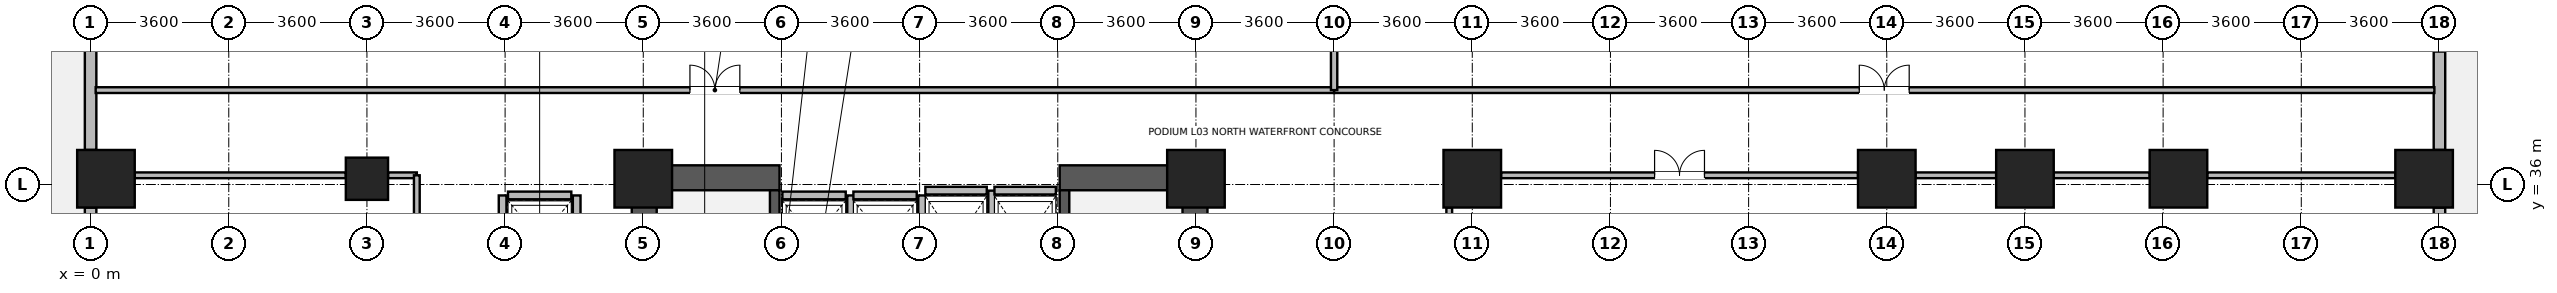
"""IFC4 building model, lengths in metres.
Left out: names, types, materials, properties, quantities, classifications, styles, units other than length and angle.
Written with IfcOpenShell. Run it as: python <this file> out.ifc"""

import sys

from ifc_helpers import new_model, si_unit, direction, frame, frame_2d, origin, origin_2d, place, context, subcontext, project, spatial, rectangle, circle, extrude, source, transform, mapped, element, fill, save


model = new_model("IFC4")
c1 = context("Model", 3, precision=1e-05, world=origin(), true_north=direction((0.0, 1.0)))
c2 = subcontext(c1, "Body", "Model", "MODEL_VIEW")
j1 = project(units=[si_unit("LENGTHUNIT", "METRE"), si_unit("PLANEANGLEUNIT", "RADIAN")], contexts=[c1])
p1 = place(None, origin())
s1 = spatial("IfcSite", under=j1, at=p1, CompositionType="ELEMENT")
p2 = place(p1, origin())
s2 = spatial("IfcBuilding", under=s1, at=p2, CompositionType="ELEMENT")
p3 = place(p2, frame((0.0, 0.0, 15.0)))
s3 = spatial("IfcBuildingStorey", under=s2, at=p3, CompositionType="ELEMENT", Elevation=15.0)
for number, where, z_axis, x_axis in (
    (1, (14.425, 28.2, 0.0), (0.0, 0.0, 1.0), (0.0, 1.0, 0.0)),
    (2, (28.775, 28.2, 0.0), (0.0, 0.0, 1.0), (0.0, 1.0, 0.0)),
):
    element("IfcWall", number, at=place(p3, frame(where, z_axis=z_axis, x_axis=x_axis)), inside=s3, PredefinedType="SHEAR", context=c2, shape_type="SweptSolid", body=[
        extrude(rectangle(XDim=8.3, YDim=0.65, at=frame_2d((4.15, 0.0))), origin(), (0.0, 0.0, 1.0), 4.38),
    ])
for number, where, z_axis, x_axis in (
    (3, (14.75, 36.175, 0.0), (0.0, 0.0, 1.0), (1.0, 0.0, 0.0)),
    (4, (25.25, 36.175, 0.0), (0.0, 0.0, 1.0), (1.0, 0.0, 0.0)),
):
    element("IfcWall", number, at=place(p3, frame(where, z_axis=z_axis, x_axis=x_axis)), inside=s3, PredefinedType="SHEAR", context=c2, shape_type="SweptSolid", body=[
        extrude(rectangle(XDim=3.2, YDim=0.65, at=frame_2d((1.6, 0.0))), origin(), (0.0, 0.0, 1.0), 4.38),
    ])
p4 = place(p3, frame((17.825, 28.85, 0.0), z_axis=(0.0, 0.0, 1.0), x_axis=(0.0, 1.0, 0.0)))
e5 = element("IfcWall", 5, at=p4, inside=s3, PredefinedType="SHEAR", context=c2, shape_type="SweptSolid", body=[
    extrude(rectangle(XDim=7.0, YDim=0.25, at=frame_2d((3.5, 0.0))), origin(), (0.0, 0.0, 1.0), 4.38),
])
p5 = place(p4, frame((0.15, 0.0, 0.0)))
e6 = element("IfcOpeningElement", 6, at=p5, cuts=e5, PredefinedType="OPENING", context=c2, shape_type="SweptSolid", body=[
    extrude(rectangle(XDim=1.1, YDim=2.08, at=frame_2d((0.55, 1.04))), frame((0.0, 0.135, 0.0), z_axis=(0.0, -1.0, 0.0), x_axis=(1.0, 0.0, 0.0)), (0.0, 0.0, 1.0), 0.27),
])
p6 = place(p3, frame((25.375, 28.85, 0.0), z_axis=(0.0, 0.0, 1.0), x_axis=(0.0, 1.0, 0.0)))
e7 = element("IfcWall", 7, at=p6, inside=s3, PredefinedType="SHEAR", context=c2, shape_type="SweptSolid", body=[
    extrude(rectangle(XDim=7.0, YDim=0.25, at=frame_2d((3.5, 0.0))), origin(), (0.0, 0.0, 1.0), 4.38),
])
p7 = place(p6, frame((0.15, 0.0, 0.0)))
e8 = element("IfcOpeningElement", 8, at=p7, cuts=e7, PredefinedType="OPENING", context=c2, shape_type="SweptSolid", body=[
    extrude(rectangle(XDim=1.1, YDim=2.08, at=frame_2d((0.55, 1.04))), frame((0.0, 0.135, 0.0), z_axis=(0.0, -1.0, 0.0), x_axis=(1.0, 0.0, 0.0)), (0.0, 0.0, 1.0), 0.27),
])
m1 = source(origin(), c2, "Body", "SweptSolid", [
    extrude(circle(Radius=0.55, at=origin_2d()), origin(), (0.0, 0.0, 1.0), 4.8),
])
p8 = place(p3, frame((7.2, 36.15, 0.0), z_axis=(0.0, 0.0, 1.0), x_axis=(1.0, 0.0, 0.0)))
e9 = element("IfcColumn", 9, at=p8, inside=s3, PredefinedType="COLUMN", context=c2, shape_type="MappedRepresentation", body=[
    mapped(m1, transform((0.0, 0.0, 0.0), x_axis=(1.0, 0.0, 0.0), y_axis=(0.0, 1.0, 0.0), z_axis=(0.0, 0.0, 1.0), scale=1.0)),
])
m2 = source(origin(), c2, "Body", "SweptSolid", [
    extrude(rectangle(XDim=1.5, YDim=1.5, at=origin_2d()), origin(), (0.0, 0.0, 1.0), 4.8),
])
for number, where, z_axis, x_axis in (
    (10, (14.4, 36.15, 0.0), (0.0, 0.0, 1.0), (1.0, 0.0, 0.0)),
    (11, (28.8, 36.15, 0.0), (0.0, 0.0, 1.0), (1.0, 0.0, 0.0)),
    (12, (36.0, 36.15, 0.0), (0.0, 0.0, 1.0), (1.0, 0.0, 0.0)),
    (13, (46.8, 36.15, 0.0), (0.0, 0.0, 1.0), (1.0, 0.0, 0.0)),
    (14, (50.4, 36.15, 0.0), (0.0, 0.0, 1.0), (1.0, 0.0, 0.0)),
    (15, (54.4, 36.15, 0.0), (0.0, 0.0, 1.0), (1.0, 0.0, 0.0)),
    (16, (0.4, 36.15, 0.0), (0.0, 0.0, 1.0), (1.0, 0.0, 0.0)),
    (17, (60.8, 36.15, 0.0), (0.0, 0.0, 1.0), (1.0, 0.0, 0.0)),
):
    element("IfcColumn", number, at=place(p3, frame(where, z_axis=z_axis, x_axis=x_axis)), inside=s3, PredefinedType="COLUMN", context=c2, shape_type="MappedRepresentation", body=[
        mapped(m2, transform((0.0, 0.0, 0.0), x_axis=(1.0, 0.0, 0.0), y_axis=(0.0, 1.0, 0.0), z_axis=(0.0, 0.0, 1.0), scale=1.0)),
    ])
p9 = place(p3, frame((61.2, 35.399, 0.0), z_axis=(0.0, 0.0, 1.0), x_axis=(0.0, -1.0, 0.0)))
e18 = element("IfcWall", 18, at=p9, inside=s3, PredefinedType="STANDARD", context=c2, shape_type="SweptSolid", body=[
    extrude(rectangle(XDim=5.998, YDim=0.3, at=frame_2d((2.999, 0.0))), origin(), (0.0, 0.0, 1.0), 4.36),
])
p10 = place(p9, frame((2.524, 0.0, 0.9)))
e19 = element("IfcOpeningElement", 19, at=p10, cuts=e18, PredefinedType="OPENING", context=c2, shape_type="SweptSolid", body=[
    extrude(rectangle(XDim=0.95, YDim=1.75, at=frame_2d((0.475, 0.875))), frame((0.0, 0.16, 0.0), z_axis=(0.0, -1.0, 0.0), x_axis=(1.0, 0.0, 0.0)), (0.0, 0.0, 1.0), 0.32),
])
p11 = place(p9, frame((1.037, 0.0, 0.9)))
e20 = element("IfcOpeningElement", 20, at=p11, cuts=e18, PredefinedType="OPENING", context=c2, shape_type="SweptSolid", body=[
    extrude(rectangle(XDim=0.95, YDim=1.75, at=frame_2d((0.475, 0.875))), frame((0.0, 0.16, 0.0), z_axis=(0.0, -1.0, 0.0), x_axis=(1.0, 0.0, 0.0)), (0.0, 0.0, 1.0), 0.32),
])
p12 = place(p3, frame((61.2, 44.099, 0.0), z_axis=(0.0, 0.0, 1.0), x_axis=(0.0, -1.0, 0.0)))
e21 = element("IfcWall", 21, at=p12, inside=s3, PredefinedType="STANDARD", context=c2, shape_type="SweptSolid", body=[
    extrude(rectangle(XDim=7.198, YDim=0.3, at=frame_2d((3.599, 0.0))), origin(), (0.0, 0.0, 1.0), 4.36),
])
p13 = place(p12, frame((0.6, 0.0, 0.9)))
e22 = element("IfcOpeningElement", 22, at=p13, cuts=e21, PredefinedType="OPENING", context=c2, shape_type="SweptSolid", body=[
    extrude(rectangle(XDim=2.4, YDim=2.5, at=frame_2d((1.2, 1.25))), frame((0.0, 0.16, 0.0), z_axis=(0.0, -1.0, 0.0), x_axis=(1.0, 0.0, 0.0)), (0.0, 0.0, 1.0), 0.32),
])
p14 = place(p12, frame((3.7, 0.0, 0.9)))
e23 = element("IfcOpeningElement", 23, at=p14, cuts=e21, PredefinedType="OPENING", context=c2, shape_type="SweptSolid", body=[
    extrude(rectangle(XDim=0.95, YDim=1.75, at=frame_2d((0.475, 0.875))), frame((0.0, 0.16, 0.0), z_axis=(0.0, -1.0, 0.0), x_axis=(1.0, 0.0, 0.0)), (0.0, 0.0, 1.0), 0.32),
])
p15 = place(p3, frame((0.0, 36.901, 0.0), z_axis=(0.0, 0.0, 1.0), x_axis=(0.0, 1.0, 0.0)))
e24 = element("IfcWall", 24, at=p15, inside=s3, PredefinedType="STANDARD", context=c2, shape_type="SweptSolid", body=[
    extrude(rectangle(XDim=7.198, YDim=0.3, at=frame_2d((3.599, 0.0))), origin(), (0.0, 0.0, 1.0), 4.36),
])
p16 = place(p15, frame((2.699, 0.0, 0.0)))
e25 = element("IfcOpeningElement", 25, at=p16, cuts=e24, PredefinedType="OPENING", context=c2, shape_type="SweptSolid", body=[
    extrude(rectangle(XDim=1.8, YDim=2.2, at=frame_2d((0.9, 1.1))), frame((0.0, 0.16, 0.0), z_axis=(0.0, -1.0, 0.0), x_axis=(1.0, 0.0, 0.0)), (0.0, 0.0, 1.0), 0.32),
])
p17 = place(p3, frame((0.0, 29.401, 0.0), z_axis=(0.0, 0.0, 1.0), x_axis=(0.0, 1.0, 0.0)))
e26 = element("IfcWall", 26, at=p17, inside=s3, PredefinedType="STANDARD", context=c2, shape_type="SweptSolid", body=[
    extrude(rectangle(XDim=5.998, YDim=0.3, at=frame_2d((2.999, 0.0))), origin(), (0.0, 0.0, 1.0), 4.36),
])
p18 = place(p17, frame((2.524, 0.0, 0.9)))
e27 = element("IfcOpeningElement", 27, at=p18, cuts=e26, PredefinedType="OPENING", context=c2, shape_type="SweptSolid", body=[
    extrude(rectangle(XDim=0.95, YDim=1.75, at=frame_2d((0.475, 0.875))), frame((0.0, 0.16, 0.0), z_axis=(0.0, -1.0, 0.0), x_axis=(1.0, 0.0, 0.0)), (0.0, 0.0, 1.0), 0.32),
])
p19 = place(p17, frame((1.037, 0.0, 0.9)))
e28 = element("IfcOpeningElement", 28, at=p19, cuts=e26, PredefinedType="OPENING", context=c2, shape_type="SweptSolid", body=[
    extrude(rectangle(XDim=0.95, YDim=1.75, at=frame_2d((0.475, 0.875))), frame((0.0, 0.16, 0.0), z_axis=(0.0, -1.0, 0.0), x_axis=(1.0, 0.0, 0.0)), (0.0, 0.0, 1.0), 0.32),
])
p20 = place(p3, frame((18.025, 35.715, 0.0), z_axis=(0.0, 0.0, 1.0), x_axis=(1.0, 0.0, 0.0)))
e29 = element("IfcWall", 29, at=p20, inside=s3, PredefinedType="PARTITIONING", context=c2, shape_type="SweptSolid", body=[
    extrude(rectangle(XDim=1.65, YDim=0.2, at=frame_2d((0.825, 0.0))), origin(), (0.0, 0.0, 1.0), 4.36),
])
p21 = place(p3, frame((19.815, 33.485, 0.0), z_axis=(0.0, 0.0, 1.0), x_axis=(0.0, 1.0, 0.0)))
e30 = element("IfcWall", 30, at=p21, inside=s3, PredefinedType="PARTITIONING", context=c2, shape_type="SweptSolid", body=[
    extrude(rectangle(XDim=2.23, YDim=0.2, at=frame_2d((1.115, 0.0))), origin(), (0.0, 0.0, 1.0), 4.36),
])
p22 = place(p3, frame((19.875, 35.715, 0.0), z_axis=(0.0, 0.0, 1.0), x_axis=(1.0, 0.0, 0.0)))
e31 = element("IfcWall", 31, at=p22, inside=s3, PredefinedType="PARTITIONING", context=c2, shape_type="SweptSolid", body=[
    extrude(rectangle(XDim=1.65, YDim=0.2, at=frame_2d((0.825, 0.0))), origin(), (0.0, 0.0, 1.0), 4.36),
])
p23 = place(p3, frame((21.665, 33.485, 0.0), z_axis=(0.0, 0.0, 1.0), x_axis=(0.0, 1.0, 0.0)))
e32 = element("IfcWall", 32, at=p23, inside=s3, PredefinedType="PARTITIONING", context=c2, shape_type="SweptSolid", body=[
    extrude(rectangle(XDim=2.23, YDim=0.2, at=frame_2d((1.115, 0.0))), origin(), (0.0, 0.0, 1.0), 4.36),
])
p24 = place(p3, frame((10.875, 35.715, 0.0), z_axis=(0.0, 0.0, 1.0), x_axis=(1.0, 0.0, 0.0)))
e33 = element("IfcWall", 33, at=p24, inside=s3, PredefinedType="PARTITIONING", context=c2, shape_type="SweptSolid", body=[
    extrude(rectangle(XDim=1.65, YDim=0.2, at=frame_2d((0.825, 0.0))), origin(), (0.0, 0.0, 1.0), 4.36),
])
for number, where, z_axis, x_axis in (
    (34, (10.735, 33.485, 0.0), (0.0, 0.0, 1.0), (0.0, 1.0, 0.0)),
    (35, (12.665, 33.485, 0.0), (0.0, 0.0, 1.0), (0.0, 1.0, 0.0)),
):
    element("IfcWall", number, at=place(p3, frame(where, z_axis=z_axis, x_axis=x_axis)), inside=s3, PredefinedType="PARTITIONING", context=c2, shape_type="SweptSolid", body=[
        extrude(rectangle(XDim=2.23, YDim=0.2, at=frame_2d((1.115, 0.0))), origin(), (0.0, 0.0, 1.0), 4.36),
    ])
p25 = place(p3, frame((21.75, 35.84, 0.0), z_axis=(0.0, 0.0, 1.0), x_axis=(1.0, 0.0, 0.0)))
e36 = element("IfcWall", 36, at=p25, inside=s3, PredefinedType="PARTITIONING", context=c2, shape_type="SweptSolid", body=[
    extrude(rectangle(XDim=1.6, YDim=0.2, at=frame_2d((0.8, 0.0))), origin(), (0.0, 0.0, 1.0), 3.16),
])
p26 = place(p3, frame((23.49, 33.16, 0.0), z_axis=(0.0, 0.0, 1.0), x_axis=(0.0, 1.0, 0.0)))
e37 = element("IfcWall", 37, at=p26, inside=s3, PredefinedType="PARTITIONING", context=c2, shape_type="SweptSolid", body=[
    extrude(rectangle(XDim=2.68, YDim=0.2, at=frame_2d((1.34, 0.0))), origin(), (0.0, 0.0, 1.0), 4.36),
])
p27 = place(p3, frame((23.55, 35.84, 0.0), z_axis=(0.0, 0.0, 1.0), x_axis=(1.0, 0.0, 0.0)))
e38 = element("IfcWall", 38, at=p27, inside=s3, PredefinedType="PARTITIONING", context=c2, shape_type="SweptSolid", body=[
    extrude(rectangle(XDim=1.6, YDim=0.2, at=frame_2d((0.8, 0.0))), origin(), (0.0, 0.0, 1.0), 3.16),
])
p28 = place(p3, frame((0.132, 38.46, 0.0), z_axis=(0.0, 0.0, 1.0), x_axis=(1.0, 0.0, 0.0)))
e39 = element("IfcWall", 39, at=p28, inside=s3, PredefinedType="PARTITIONING", context=c2, shape_type="SweptSolid", body=[
    extrude(rectangle(XDim=32.268, YDim=0.15, at=frame_2d((16.134, 0.0))), origin(), (0.0, 0.0, 1.0), 4.36),
])
p29 = place(p28, frame((15.484, 0.0, 0.0)))
e40 = element("IfcOpeningElement", 40, at=p29, cuts=e39, PredefinedType="OPENING", context=c2, shape_type="SweptSolid", body=[
    extrude(rectangle(XDim=1.3, YDim=2.12, at=frame_2d((0.65, 1.06))), frame((0.0, 0.085, 0.0), z_axis=(0.0, -1.0, 0.0), x_axis=(1.0, 0.0, 0.0)), (0.0, 0.0, 1.0), 0.17),
])
p30 = place(p3, frame((32.4, 38.46, 0.0), z_axis=(0.0, 0.0, 1.0), x_axis=(1.0, 0.0, 0.0)))
e41 = element("IfcWall", 41, at=p30, inside=s3, PredefinedType="PARTITIONING", context=c2, shape_type="SweptSolid", body=[
    extrude(rectangle(XDim=28.668, YDim=0.15, at=frame_2d((14.334, 0.0))), origin(), (0.0, 0.0, 1.0), 4.36),
])
p31 = place(p30, frame((13.684, 0.0, 0.0)))
e42 = element("IfcOpeningElement", 42, at=p31, cuts=e41, PredefinedType="OPENING", context=c2, shape_type="SweptSolid", body=[
    extrude(rectangle(XDim=1.3, YDim=2.12, at=frame_2d((0.65, 1.06))), frame((0.0, 0.085, 0.0), z_axis=(0.0, -1.0, 0.0), x_axis=(1.0, 0.0, 0.0)), (0.0, 0.0, 1.0), 0.17),
])
p32 = place(p3, frame((36.75, 36.24, 0.0), z_axis=(0.0, 0.0, 1.0), x_axis=(1.0, 0.0, 0.0)))
e43 = element("IfcWall", 43, at=p32, inside=s3, PredefinedType="PARTITIONING", context=c2, shape_type="SweptSolid", body=[
    extrude(rectangle(XDim=9.3, YDim=0.15, at=frame_2d((4.65, 0.0))), origin(), (0.0, 0.0, 1.0), 3.66),
])
p33 = place(p32, frame((4.0, 0.0, 0.0)))
e44 = element("IfcOpeningElement", 44, at=p33, cuts=e43, PredefinedType="OPENING", context=c2, shape_type="SweptSolid", body=[
    extrude(rectangle(XDim=1.3, YDim=2.12, at=frame_2d((0.65, 1.06))), frame((0.0, 0.085, 0.0), z_axis=(0.0, -1.0, 0.0), x_axis=(1.0, 0.0, 0.0)), (0.0, 0.0, 1.0), 0.17),
])
p34 = place(p3, frame((47.55, 36.24, 0.0), z_axis=(0.0, 0.0, 1.0), x_axis=(1.0, 0.0, 0.0)))
e45 = element("IfcWall", 45, at=p34, inside=s3, PredefinedType="PARTITIONING", context=c2, shape_type="SweptSolid", body=[
    extrude(rectangle(XDim=2.1, YDim=0.15, at=frame_2d((1.05, 0.0))), origin(), (0.0, 0.0, 1.0), 3.66),
])
p35 = place(p3, frame((51.15, 36.24, 0.0), z_axis=(0.0, 0.0, 1.0), x_axis=(1.0, 0.0, 0.0)))
e46 = element("IfcWall", 46, at=p35, inside=s3, PredefinedType="PARTITIONING", context=c2, shape_type="SweptSolid", body=[
    extrude(rectangle(XDim=2.5, YDim=0.15, at=frame_2d((1.25, 0.0))), origin(), (0.0, 0.0, 1.0), 3.66),
])
p36 = place(p3, frame((55.15, 36.24, 0.0), z_axis=(0.0, 0.0, 1.0), x_axis=(1.0, 0.0, 0.0)))
e47 = element("IfcWall", 47, at=p36, inside=s3, PredefinedType="PARTITIONING", context=c2, shape_type="SweptSolid", body=[
    extrude(rectangle(XDim=4.9, YDim=0.15, at=frame_2d((2.45, 0.0))), origin(), (0.0, 0.0, 1.0), 3.66),
])
p37 = place(p3, frame((35.4, 29.4, 0.0), z_axis=(0.0, 0.0, 1.0), x_axis=(0.0, 1.0, 0.0)))
e48 = element("IfcWall", 48, at=p37, inside=s3, PredefinedType="PARTITIONING", context=c2, shape_type="SweptSolid", body=[
    extrude(rectangle(XDim=6.0, YDim=0.15, at=frame_2d((3.0, 0.0))), origin(), (0.0, 0.0, 1.0), 4.36),
])
p38 = place(p3, frame((1.15, 36.24, 0.0), z_axis=(0.0, 0.0, 1.0), x_axis=(1.0, 0.0, 0.0)))
e49 = element("IfcWall", 49, at=p38, inside=s3, PredefinedType="PARTITIONING", context=c2, shape_type="SweptSolid", body=[
    extrude(rectangle(XDim=5.5, YDim=0.15, at=frame_2d((2.75, 0.0))), origin(), (0.0, 0.0, 1.0), 3.66),
])
p39 = place(p3, frame((7.75, 36.24, 0.0), z_axis=(0.0, 0.0, 1.0), x_axis=(1.0, 0.0, 0.0)))
e50 = element("IfcWall", 50, at=p39, inside=s3, PredefinedType="PARTITIONING", context=c2, shape_type="SweptSolid", body=[
    extrude(rectangle(XDim=0.75, YDim=0.15, at=frame_2d((0.375, 0.0))), origin(), (0.0, 0.0, 1.0), 3.66),
])
p40 = place(p3, frame((8.5, 28.56, 0.0), z_axis=(0.0, 0.0, 1.0), x_axis=(0.0, 1.0, 0.0)))
e51 = element("IfcWall", 51, at=p40, inside=s3, PredefinedType="PARTITIONING", context=c2, shape_type="SweptSolid", body=[
    extrude(rectangle(XDim=7.68, YDim=0.15, at=frame_2d((3.84, 0.0))), origin(), (0.0, 0.0, 1.0), 4.36),
])
p41 = place(p3, frame((32.4, 38.46, 0.0), z_axis=(0.0, 0.0, 1.0), x_axis=(0.0, 1.0, 0.0)))
e52 = element("IfcWall", 52, at=p41, inside=s3, PredefinedType="PARTITIONING", context=c2, shape_type="SweptSolid", body=[
    extrude(rectangle(XDim=6.408, YDim=0.165, at=frame_2d((3.204, 0.0))), origin(), (0.0, 0.0, 1.0), 4.36),
])
p42 = place(p14, origin())
e53 = element("IfcWindow", 53, at=p42, inside=s3, PartitioningType="SINGLE_PANEL", PredefinedType="WINDOW", context=c2, shape_type="SweptSolid", body=[
    extrude(rectangle(XDim=0.95, YDim=1.75, at=frame_2d((0.475, 0.875))), frame((0.0, 0.03, 0.0), z_axis=(0.0, -1.0, 0.0), x_axis=(1.0, 0.0, 0.0)), (0.0, 0.0, 1.0), 0.06),
])
fill(e23, e53)
p43 = place(p29, origin())
e54 = element("IfcDoor", 54, at=p43, inside=s3, OperationType="DOUBLE_DOOR_SINGLE_SWING", PredefinedType="DOOR", context=c2, shape_type="SweptSolid", body=[
    extrude(rectangle(XDim=1.3, YDim=2.12, at=frame_2d((0.65, 1.06))), frame((0.0, 0.025, 0.0), z_axis=(0.0, -1.0, 0.0), x_axis=(1.0, 0.0, 0.0)), (0.0, 0.0, 1.0), 0.05),
])
fill(e40, e54)
p44 = place(p31, origin())
e55 = element("IfcDoor", 55, at=p44, inside=s3, OperationType="DOUBLE_DOOR_SINGLE_SWING", PredefinedType="DOOR", context=c2, shape_type="SweptSolid", body=[
    extrude(rectangle(XDim=1.3, YDim=2.12, at=frame_2d((0.65, 1.06))), frame((0.0, 0.025, 0.0), z_axis=(0.0, -1.0, 0.0), x_axis=(1.0, 0.0, 0.0)), (0.0, 0.0, 1.0), 0.05),
])
fill(e42, e55)
p45 = place(p33, origin())
e56 = element("IfcDoor", 56, at=p45, inside=s3, OperationType="DOUBLE_DOOR_SINGLE_SWING", PredefinedType="DOOR", context=c2, shape_type="SweptSolid", body=[
    extrude(rectangle(XDim=1.3, YDim=2.12, at=frame_2d((0.65, 1.06))), frame((0.0, 0.025, 0.0), z_axis=(0.0, -1.0, 0.0), x_axis=(1.0, 0.0, 0.0)), (0.0, 0.0, 1.0), 0.05),
])
fill(e44, e56)
save(model, sys.argv[1])
